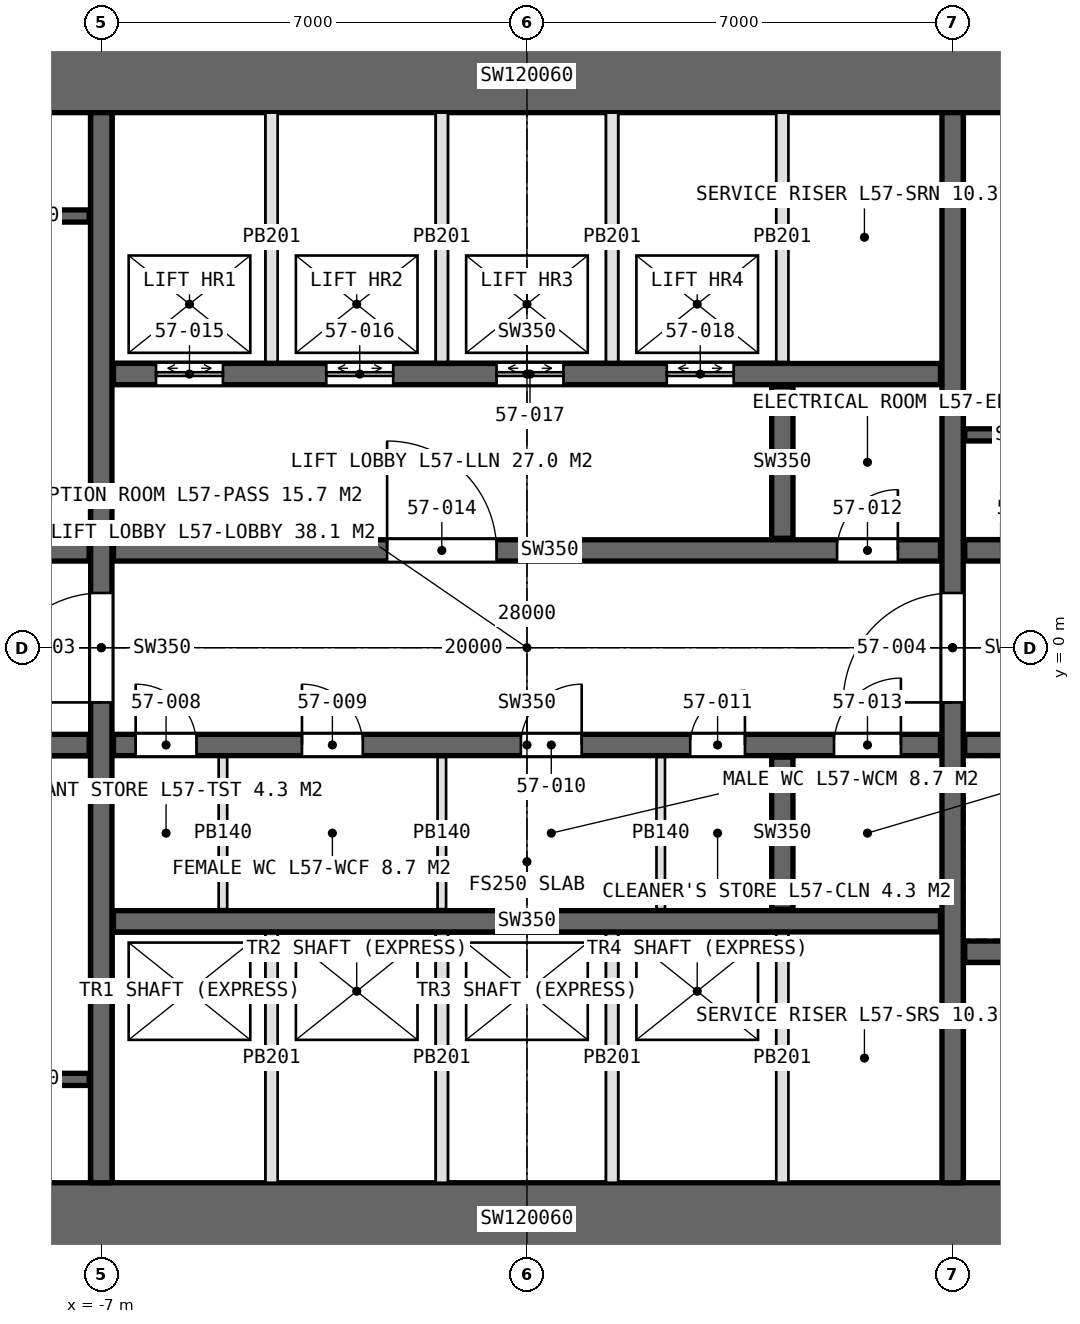
"""IFC4 building model, lengths in metres.
Left out: names, types, materials, properties, quantities, classifications, styles, units other than length and angle.
Written with IfcOpenShell. Run it as: python <this file> out.ifc"""

import sys

from ifc_helpers import new_model, si_unit, direction, frame, frame_2d, origin, place, context, subcontext, project, spatial, rectangle, extrude, element, fill, save


model = new_model("IFC4")
c1 = context("Model", 3, precision=1e-05, world=origin(), true_north=direction((0.0, 1.0)))
c2 = subcontext(c1, "Body", "Model", "MODEL_VIEW")
j1 = project(units=[si_unit("LENGTHUNIT", "METRE"), si_unit("PLANEANGLEUNIT", "RADIAN")], contexts=[c1])
p1 = place(None, origin())
s1 = spatial("IfcSite", under=j1, at=p1, CompositionType="ELEMENT")
p2 = place(p1, origin())
s2 = spatial("IfcBuilding", under=s1, at=p2, CompositionType="ELEMENT")
p3 = place(p2, frame((0.0, 0.0, 257.8)))
s3 = spatial("IfcBuildingStorey", under=s2, at=p3, CompositionType="ELEMENT", Elevation=257.8)
p4 = place(p3, frame((-14.0, -9.4, 0.0), z_axis=(0.0, 0.0, 1.0), x_axis=(1.0, 0.0, 0.0)))
e1 = element("IfcWall", 1, at=p4, inside=s3, PredefinedType="SHEAR", context=c2, shape_type="SweptSolid", body=[
    extrude(rectangle(XDim=28.0, YDim=1.2, at=frame_2d((14.0, 0.0))), origin(), (0.0, 0.0, 1.0), 4.2),
])
p5 = place(p4, frame((22.9, 0.0, 0.0)))
e2 = element("IfcOpeningElement", 2, at=p5, cuts=e1, PredefinedType="OPENING", context=c2, shape_type="SweptSolid", body=[
    extrude(rectangle(XDim=2.2, YDim=2.7, at=frame_2d((1.1, 1.35))), frame((0.0, 0.61, 0.0), z_axis=(0.0, -1.0, 0.0), x_axis=(1.0, 0.0, 0.0)), (0.0, 0.0, 1.0), 1.22),
])
p6 = place(p3, frame((14.0, 9.4, 0.0), z_axis=(0.0, 0.0, 1.0), x_axis=(-1.0, 0.0, 0.0)))
e3 = element("IfcWall", 3, at=p6, inside=s3, PredefinedType="SHEAR", context=c2, shape_type="SweptSolid", body=[
    extrude(rectangle(XDim=28.0, YDim=1.2, at=frame_2d((14.0, 0.0))), origin(), (0.0, 0.0, 1.0), 4.2),
])
p7 = place(p6, frame((24.0, 0.0, 0.0)))
e4 = element("IfcOpeningElement", 4, at=p7, cuts=e3, PredefinedType="OPENING", context=c2, shape_type="SweptSolid", body=[
    extrude(rectangle(XDim=1.0, YDim=2.4, at=frame_2d((0.5, 1.2))), frame((0.0, 0.61, 0.0), z_axis=(0.0, -1.0, 0.0), x_axis=(1.0, 0.0, 0.0)), (0.0, 0.0, 1.0), 1.22),
])
p8 = place(p3, frame((-7.0, -8.8, 0.0), z_axis=(0.0, 0.0, 1.0), x_axis=(0.0, 1.0, 0.0)))
e5 = element("IfcWall", 5, at=p8, inside=s3, PredefinedType="SHEAR", context=c2, shape_type="SweptSolid", body=[
    extrude(rectangle(XDim=17.6, YDim=0.35, at=frame_2d((8.8, 0.0))), origin(), (0.0, 0.0, 1.0), 4.2),
])
p9 = place(p8, frame((7.9, 0.0, 0.0)))
e6 = element("IfcOpeningElement", 6, at=p9, cuts=e5, PredefinedType="OPENING", context=c2, shape_type="SweptSolid", body=[
    extrude(rectangle(XDim=1.8, YDim=2.4, at=frame_2d((0.9, 1.2))), frame((0.0, 0.185, 0.0), z_axis=(0.0, -1.0, 0.0), x_axis=(1.0, 0.0, 0.0)), (0.0, 0.0, 1.0), 0.37),
])
p10 = place(p3, frame((7.0, -8.8, 0.0), z_axis=(0.0, 0.0, 1.0), x_axis=(0.0, 1.0, 0.0)))
e7 = element("IfcWall", 7, at=p10, inside=s3, PredefinedType="SHEAR", context=c2, shape_type="SweptSolid", body=[
    extrude(rectangle(XDim=17.6, YDim=0.35, at=frame_2d((8.8, 0.0))), origin(), (0.0, 0.0, 1.0), 4.2),
])
p11 = place(p10, frame((7.9, 0.0, 0.0)))
e8 = element("IfcOpeningElement", 8, at=p11, cuts=e7, PredefinedType="OPENING", context=c2, shape_type="SweptSolid", body=[
    extrude(rectangle(XDim=1.8, YDim=2.4, at=frame_2d((0.9, 1.2))), frame((0.0, 0.185, 0.0), z_axis=(0.0, -1.0, 0.0), x_axis=(1.0, 0.0, 0.0)), (0.0, 0.0, 1.0), 0.37),
])
p12 = place(p3, frame((-6.8, 1.6, 0.0), z_axis=(0.0, 0.0, 1.0), x_axis=(1.0, 0.0, 0.0)))
e9 = element("IfcWall", 9, at=p12, inside=s3, PredefinedType="SHEAR", context=c2, shape_type="SweptSolid", body=[
    extrude(rectangle(XDim=13.6, YDim=0.35, at=frame_2d((6.8, 0.0))), origin(), (0.0, 0.0, 1.0), 4.2),
])
p13 = place(p12, frame((11.9, 0.0, 0.0)))
e10 = element("IfcOpeningElement", 10, at=p13, cuts=e9, PredefinedType="OPENING", context=c2, shape_type="SweptSolid", body=[
    extrude(rectangle(XDim=1.0, YDim=2.4, at=frame_2d((0.5, 1.2))), frame((0.0, 0.185, 0.0), z_axis=(0.0, -1.0, 0.0), x_axis=(1.0, 0.0, 0.0)), (0.0, 0.0, 1.0), 0.37),
])
p14 = place(p12, frame((4.5, 0.0, 0.0)))
e11 = element("IfcOpeningElement", 11, at=p14, cuts=e9, PredefinedType="OPENING", context=c2, shape_type="SweptSolid", body=[
    extrude(rectangle(XDim=1.8, YDim=2.4, at=frame_2d((0.9, 1.2))), frame((0.0, 0.185, 0.0), z_axis=(0.0, -1.0, 0.0), x_axis=(1.0, 0.0, 0.0)), (0.0, 0.0, 1.0), 0.37),
])
p15 = place(p3, frame((-6.8, -1.6, 0.0), z_axis=(0.0, 0.0, 1.0), x_axis=(1.0, 0.0, 0.0)))
e12 = element("IfcWall", 12, at=p15, inside=s3, PredefinedType="SHEAR", context=c2, shape_type="SweptSolid", body=[
    extrude(rectangle(XDim=13.6, YDim=0.35, at=frame_2d((6.8, 0.0))), origin(), (0.0, 0.0, 1.0), 4.2),
])
p16 = place(p15, frame((0.365, 0.0, 0.0)))
e13 = element("IfcOpeningElement", 13, at=p16, cuts=e12, PredefinedType="OPENING", context=c2, shape_type="SweptSolid", body=[
    extrude(rectangle(XDim=1.0, YDim=2.4, at=frame_2d((0.5, 1.2))), frame((0.0, 0.185, 0.0), z_axis=(0.0, -1.0, 0.0), x_axis=(1.0, 0.0, 0.0)), (0.0, 0.0, 1.0), 0.37),
])
p17 = place(p15, frame((3.1, 0.0, 0.0)))
e14 = element("IfcOpeningElement", 14, at=p17, cuts=e12, PredefinedType="OPENING", context=c2, shape_type="SweptSolid", body=[
    extrude(rectangle(XDim=1.0, YDim=2.4, at=frame_2d((0.5, 1.2))), frame((0.0, 0.185, 0.0), z_axis=(0.0, -1.0, 0.0), x_axis=(1.0, 0.0, 0.0)), (0.0, 0.0, 1.0), 0.37),
])
p18 = place(p15, frame((6.7, 0.0, 0.0)))
e15 = element("IfcOpeningElement", 15, at=p18, cuts=e12, PredefinedType="OPENING", context=c2, shape_type="SweptSolid", body=[
    extrude(rectangle(XDim=1.0, YDim=2.4, at=frame_2d((0.5, 1.2))), frame((0.0, 0.185, 0.0), z_axis=(0.0, -1.0, 0.0), x_axis=(1.0, 0.0, 0.0)), (0.0, 0.0, 1.0), 0.37),
])
p19 = place(p15, frame((9.485, 0.0, 0.0)))
e16 = element("IfcOpeningElement", 16, at=p19, cuts=e12, PredefinedType="OPENING", context=c2, shape_type="SweptSolid", body=[
    extrude(rectangle(XDim=0.9, YDim=2.4, at=frame_2d((0.45, 1.2))), frame((0.0, 0.185, 0.0), z_axis=(0.0, -1.0, 0.0), x_axis=(1.0, 0.0, 0.0)), (0.0, 0.0, 1.0), 0.37),
])
p20 = place(p15, frame((11.85, 0.0, 0.0)))
e17 = element("IfcOpeningElement", 17, at=p20, cuts=e12, PredefinedType="OPENING", context=c2, shape_type="SweptSolid", body=[
    extrude(rectangle(XDim=1.1, YDim=2.4, at=frame_2d((0.55, 1.2))), frame((0.0, 0.185, 0.0), z_axis=(0.0, -1.0, 0.0), x_axis=(1.0, 0.0, 0.0)), (0.0, 0.0, 1.0), 0.37),
])
p21 = place(p3, frame((-6.8, 4.5, 0.0), z_axis=(0.0, 0.0, 1.0), x_axis=(1.0, 0.0, 0.0)))
e18 = element("IfcWall", 18, at=p21, inside=s3, PredefinedType="SHEAR", context=c2, shape_type="SweptSolid", body=[
    extrude(rectangle(XDim=13.6, YDim=0.35, at=frame_2d((6.8, 0.0))), origin(), (0.0, 0.0, 1.0), 4.2),
])
p22 = place(p21, frame((0.7, 0.0, 0.0)))
e19 = element("IfcOpeningElement", 19, at=p22, cuts=e18, PredefinedType="OPENING", context=c2, shape_type="SweptSolid", body=[
    extrude(rectangle(XDim=1.1, YDim=2.4, at=frame_2d((0.55, 1.2))), frame((0.0, 0.185, 0.0), z_axis=(0.0, -1.0, 0.0), x_axis=(1.0, 0.0, 0.0)), (0.0, 0.0, 1.0), 0.37),
])
p23 = place(p21, frame((3.5, 0.0, 0.0)))
e20 = element("IfcOpeningElement", 20, at=p23, cuts=e18, PredefinedType="OPENING", context=c2, shape_type="SweptSolid", body=[
    extrude(rectangle(XDim=1.1, YDim=2.4, at=frame_2d((0.55, 1.2))), frame((0.0, 0.185, 0.0), z_axis=(0.0, -1.0, 0.0), x_axis=(1.0, 0.0, 0.0)), (0.0, 0.0, 1.0), 0.37),
])
p24 = place(p21, frame((6.3, 0.0, 0.0)))
e21 = element("IfcOpeningElement", 21, at=p24, cuts=e18, PredefinedType="OPENING", context=c2, shape_type="SweptSolid", body=[
    extrude(rectangle(XDim=1.1, YDim=2.4, at=frame_2d((0.55, 1.2))), frame((0.0, 0.185, 0.0), z_axis=(0.0, -1.0, 0.0), x_axis=(1.0, 0.0, 0.0)), (0.0, 0.0, 1.0), 0.37),
])
p25 = place(p21, frame((9.1, 0.0, 0.0)))
e22 = element("IfcOpeningElement", 22, at=p25, cuts=e18, PredefinedType="OPENING", context=c2, shape_type="SweptSolid", body=[
    extrude(rectangle(XDim=1.1, YDim=2.4, at=frame_2d((0.55, 1.2))), frame((0.0, 0.185, 0.0), z_axis=(0.0, -1.0, 0.0), x_axis=(1.0, 0.0, 0.0)), (0.0, 0.0, 1.0), 0.37),
])
p26 = place(p3, frame((-6.8, -4.5, 0.0), z_axis=(0.0, 0.0, 1.0), x_axis=(1.0, 0.0, 0.0)))
e23 = element("IfcWall", 23, at=p26, inside=s3, PredefinedType="SHEAR", context=c2, shape_type="SweptSolid", body=[
    extrude(rectangle(XDim=13.6, YDim=0.35, at=frame_2d((6.8, 0.0))), origin(), (0.0, 0.0, 1.0), 4.2),
])
for number, where, z_axis, x_axis in (
    (24, (-12.8, 1.6, 0.0), (0.0, 0.0, 1.0), (1.0, 0.0, 0.0)),
    (25, (-12.8, -1.6, 0.0), (0.0, 0.0, 1.0), (1.0, 0.0, 0.0)),
):
    element("IfcWall", number, at=place(p3, frame(where, z_axis=z_axis, x_axis=x_axis)), inside=s3, PredefinedType="SHEAR", context=c2, shape_type="SweptSolid", body=[
        extrude(rectangle(XDim=5.6, YDim=0.35, at=frame_2d((2.8, 0.0))), origin(), (0.0, 0.0, 1.0), 4.2),
    ])
p27 = place(p3, frame((7.2, 1.6, 0.0), z_axis=(0.0, 0.0, 1.0), x_axis=(1.0, 0.0, 0.0)))
e26 = element("IfcWall", 26, at=p27, inside=s3, PredefinedType="SHEAR", context=c2, shape_type="SweptSolid", body=[
    extrude(rectangle(XDim=5.6, YDim=0.35, at=frame_2d((2.8, 0.0))), origin(), (0.0, 0.0, 1.0), 4.2),
])
p28 = place(p27, frame((0.6, 0.0, 0.0)))
e27 = element("IfcOpeningElement", 27, at=p28, cuts=e26, PredefinedType="OPENING", context=c2, shape_type="SweptSolid", body=[
    extrude(rectangle(XDim=1.0, YDim=2.4, at=frame_2d((0.5, 1.2))), frame((0.0, 0.185, 0.0), z_axis=(0.0, -1.0, 0.0), x_axis=(1.0, 0.0, 0.0)), (0.0, 0.0, 1.0), 0.37),
])
p29 = place(p3, frame((7.2, -1.6, 0.0), z_axis=(0.0, 0.0, 1.0), x_axis=(1.0, 0.0, 0.0)))
e28 = element("IfcWall", 28, at=p29, inside=s3, PredefinedType="SHEAR", context=c2, shape_type="SweptSolid", body=[
    extrude(rectangle(XDim=5.6, YDim=0.35, at=frame_2d((2.8, 0.0))), origin(), (0.0, 0.0, 1.0), 4.2),
])
p30 = place(p29, frame((0.9, 0.0, 0.0)))
e29 = element("IfcOpeningElement", 29, at=p30, cuts=e28, PredefinedType="OPENING", context=c2, shape_type="SweptSolid", body=[
    extrude(rectangle(XDim=1.3, YDim=2.4, at=frame_2d((0.65, 1.2))), frame((0.0, 0.185, 0.0), z_axis=(0.0, -1.0, 0.0), x_axis=(1.0, 0.0, 0.0)), (0.0, 0.0, 1.0), 0.37),
])
p31 = place(p29, frame((3.9, 0.0, 0.0)))
e30 = element("IfcOpeningElement", 30, at=p31, cuts=e28, PredefinedType="OPENING", context=c2, shape_type="SweptSolid", body=[
    extrude(rectangle(XDim=1.3, YDim=2.4, at=frame_2d((0.65, 1.2))), frame((0.0, 0.185, 0.0), z_axis=(0.0, -1.0, 0.0), x_axis=(1.0, 0.0, 0.0)), (0.0, 0.0, 1.0), 0.37),
])
p32 = place(p3, frame((7.2, -5.0, 0.0), z_axis=(0.0, 0.0, 1.0), x_axis=(1.0, 0.0, 0.0)))
e31 = element("IfcWall", 31, at=p32, inside=s3, PredefinedType="SHEAR", context=c2, shape_type="SweptSolid", body=[
    extrude(rectangle(XDim=5.6, YDim=0.35, at=frame_2d((2.8, 0.0))), origin(), (0.0, 0.0, 1.0), 4.2),
])
for number, where, z_axis, x_axis in (
    (32, (4.2, 1.8, 0.0), (0.0, 0.0, 1.0), (0.0, 1.0, 0.0)),
    (33, (4.2, -4.3, 0.0), (0.0, 0.0, 1.0), (0.0, 1.0, 0.0)),
):
    element("IfcWall", number, at=place(p3, frame(where, z_axis=z_axis, x_axis=x_axis)), inside=s3, PredefinedType="SHEAR", context=c2, shape_type="SweptSolid", body=[
        extrude(rectangle(XDim=2.5, YDim=0.35, at=frame_2d((1.25, 0.0))), origin(), (0.0, 0.0, 1.0), 4.2),
    ])
for number, where, z_axis, x_axis in (
    (34, (-5.0, -1.8, 0.0), (0.0, 0.0, 1.0), (0.0, -1.0, 0.0)),
    (35, (-1.4, -1.8, 0.0), (0.0, 0.0, 1.0), (0.0, -1.0, 0.0)),
    (36, (2.2, -1.8, 0.0), (0.0, 0.0, 1.0), (0.0, -1.0, 0.0)),
):
    element("IfcWall", number, at=place(p3, frame(where, z_axis=z_axis, x_axis=x_axis)), inside=s3, PredefinedType="PARTITIONING", context=c2, shape_type="SweptSolid", body=[
        extrude(rectangle(XDim=2.5, YDim=0.14, at=frame_2d((1.25, 0.0))), origin(), (0.0, 0.0, 1.0), 3.95),
    ])
for number, where, z_axis, x_axis in (
    (37, (-4.2, 4.7, 0.0), (0.0, 0.0, 1.0), (0.0, 1.0, 0.0)),
    (38, (-1.4, 4.7, 0.0), (0.0, 0.0, 1.0), (0.0, 1.0, 0.0)),
    (39, (1.4, 4.7, 0.0), (0.0, 0.0, 1.0), (0.0, 1.0, 0.0)),
    (40, (4.2, 4.7, 0.0), (0.0, 0.0, 1.0), (0.0, 1.0, 0.0)),
    (41, (-4.2, -4.7, 0.0), (0.0, 0.0, 1.0), (0.0, -1.0, 0.0)),
    (42, (-1.4, -4.7, 0.0), (0.0, 0.0, 1.0), (0.0, -1.0, 0.0)),
    (43, (1.4, -4.7, 0.0), (0.0, 0.0, 1.0), (0.0, -1.0, 0.0)),
    (44, (4.2, -4.7, 0.0), (0.0, 0.0, 1.0), (0.0, -1.0, 0.0)),
):
    element("IfcWall", number, at=place(p3, frame(where, z_axis=z_axis, x_axis=x_axis)), inside=s3, PredefinedType="PARTITIONING", context=c2, shape_type="SweptSolid", body=[
        extrude(rectangle(XDim=4.1, YDim=0.2, at=frame_2d((2.05, 0.0))), origin(), (0.0, 0.0, 1.0), 4.2),
    ])
for number, where, z_axis, x_axis in (
    (45, (-9.15, 7.1, 0.0), (0.0, 0.0, 1.0), (1.0, 0.0, 0.0)),
    (46, (-9.15, -7.1, 0.0), (0.0, 0.0, 1.0), (1.0, 0.0, 0.0)),
    (47, (9.15, 3.5, 0.0), (0.0, 0.0, 1.0), (-1.0, 0.0, 0.0)),
):
    element("IfcWall", number, at=place(p3, frame(where, z_axis=z_axis, x_axis=x_axis)), inside=s3, PredefinedType="SOLIDWALL", context=c2, shape_type="SweptSolid", body=[
        extrude(rectangle(XDim=1.95, YDim=0.2, at=frame_2d((0.975, 0.0))), origin(), (0.0, 0.0, 1.0), 4.2),
    ])
p33 = place(p9, origin())
e48 = element("IfcDoor", 48, at=p33, inside=s3, OperationType="DOUBLE_DOOR_SINGLE_SWING", PredefinedType="DOOR", context=c2, shape_type="SweptSolid", body=[
    extrude(rectangle(XDim=1.8, YDim=2.4, at=frame_2d((0.9, 1.2))), frame((0.0, 0.025, 0.0), z_axis=(0.0, -1.0, 0.0), x_axis=(1.0, 0.0, 0.0)), (0.0, 0.0, 1.0), 0.05),
])
fill(e6, e48)
p34 = place(p11, origin())
e49 = element("IfcDoor", 49, at=p34, inside=s3, OperationType="DOUBLE_DOOR_SINGLE_SWING", PredefinedType="DOOR", context=c2, shape_type="SweptSolid", body=[
    extrude(rectangle(XDim=1.8, YDim=2.4, at=frame_2d((0.9, 1.2))), frame((0.0, 0.025, 0.0), z_axis=(0.0, -1.0, 0.0), x_axis=(1.0, 0.0, 0.0)), (0.0, 0.0, 1.0), 0.05),
])
fill(e8, e49)
p35 = place(p16, origin())
e50 = element("IfcDoor", 50, at=p35, inside=s3, OperationType="SINGLE_SWING_LEFT", PredefinedType="DOOR", context=c2, shape_type="SweptSolid", body=[
    extrude(rectangle(XDim=1.0, YDim=2.4, at=frame_2d((0.5, 1.2))), frame((0.0, 0.025, 0.0), z_axis=(0.0, -1.0, 0.0), x_axis=(1.0, 0.0, 0.0)), (0.0, 0.0, 1.0), 0.05),
])
fill(e13, e50)
p36 = place(p17, origin())
e51 = element("IfcDoor", 51, at=p36, inside=s3, OperationType="SINGLE_SWING_LEFT", PredefinedType="DOOR", context=c2, shape_type="SweptSolid", body=[
    extrude(rectangle(XDim=1.0, YDim=2.4, at=frame_2d((0.5, 1.2))), frame((0.0, 0.025, 0.0), z_axis=(0.0, -1.0, 0.0), x_axis=(1.0, 0.0, 0.0)), (0.0, 0.0, 1.0), 0.05),
])
fill(e14, e51)
p37 = place(p18, origin())
e52 = element("IfcDoor", 52, at=p37, inside=s3, OperationType="SINGLE_SWING_RIGHT", PredefinedType="DOOR", context=c2, shape_type="SweptSolid", body=[
    extrude(rectangle(XDim=1.0, YDim=2.4, at=frame_2d((0.5, 1.2))), frame((0.0, 0.025, 0.0), z_axis=(0.0, -1.0, 0.0), x_axis=(1.0, 0.0, 0.0)), (0.0, 0.0, 1.0), 0.05),
])
fill(e15, e52)
p38 = place(p19, origin())
e53 = element("IfcDoor", 53, at=p38, inside=s3, OperationType="SINGLE_SWING_RIGHT", PredefinedType="DOOR", context=c2, shape_type="SweptSolid", body=[
    extrude(rectangle(XDim=0.9, YDim=2.4, at=frame_2d((0.45, 1.2))), frame((0.0, 0.025, 0.0), z_axis=(0.0, -1.0, 0.0), x_axis=(1.0, 0.0, 0.0)), (0.0, 0.0, 1.0), 0.05),
])
fill(e16, e53)
p39 = place(p13, origin())
e54 = element("IfcDoor", 54, at=p39, inside=s3, OperationType="SINGLE_SWING_RIGHT", PredefinedType="DOOR", context=c2, shape_type="SweptSolid", body=[
    extrude(rectangle(XDim=1.0, YDim=2.4, at=frame_2d((0.5, 1.2))), frame((0.0, 0.025, 0.0), z_axis=(0.0, -1.0, 0.0), x_axis=(1.0, 0.0, 0.0)), (0.0, 0.0, 1.0), 0.05),
])
fill(e10, e54)
p40 = place(p20, origin())
e55 = element("IfcDoor", 55, at=p40, inside=s3, OperationType="SINGLE_SWING_RIGHT", PredefinedType="DOOR", context=c2, shape_type="SweptSolid", body=[
    extrude(rectangle(XDim=1.1, YDim=2.4, at=frame_2d((0.55, 1.2))), frame((0.0, 0.025, 0.0), z_axis=(0.0, -1.0, 0.0), x_axis=(1.0, 0.0, 0.0)), (0.0, 0.0, 1.0), 0.05),
])
fill(e17, e55)
p41 = place(p14, origin())
e56 = element("IfcDoor", 56, at=p41, inside=s3, OperationType="DOUBLE_DOOR_SINGLE_SWING", PredefinedType="DOOR", context=c2, shape_type="SweptSolid", body=[
    extrude(rectangle(XDim=1.8, YDim=2.4, at=frame_2d((0.9, 1.2))), frame((0.0, 0.025, 0.0), z_axis=(0.0, -1.0, 0.0), x_axis=(1.0, 0.0, 0.0)), (0.0, 0.0, 1.0), 0.05),
])
fill(e11, e56)
p42 = place(p22, origin())
e57 = element("IfcDoor", 57, at=p42, inside=s3, OperationType="DOUBLE_DOOR_SLIDING", PredefinedType="DOOR", context=c2, shape_type="SweptSolid", body=[
    extrude(rectangle(XDim=1.1, YDim=2.4, at=frame_2d((0.55, 1.2))), frame((0.0, 0.025, 0.0), z_axis=(0.0, -1.0, 0.0), x_axis=(1.0, 0.0, 0.0)), (0.0, 0.0, 1.0), 0.05),
])
fill(e19, e57)
p43 = place(p23, origin())
e58 = element("IfcDoor", 58, at=p43, inside=s3, OperationType="DOUBLE_DOOR_SLIDING", PredefinedType="DOOR", context=c2, shape_type="SweptSolid", body=[
    extrude(rectangle(XDim=1.1, YDim=2.4, at=frame_2d((0.55, 1.2))), frame((0.0, 0.025, 0.0), z_axis=(0.0, -1.0, 0.0), x_axis=(1.0, 0.0, 0.0)), (0.0, 0.0, 1.0), 0.05),
])
fill(e20, e58)
p44 = place(p24, origin())
e59 = element("IfcDoor", 59, at=p44, inside=s3, OperationType="DOUBLE_DOOR_SLIDING", PredefinedType="DOOR", context=c2, shape_type="SweptSolid", body=[
    extrude(rectangle(XDim=1.1, YDim=2.4, at=frame_2d((0.55, 1.2))), frame((0.0, 0.025, 0.0), z_axis=(0.0, -1.0, 0.0), x_axis=(1.0, 0.0, 0.0)), (0.0, 0.0, 1.0), 0.05),
])
fill(e21, e59)
p45 = place(p25, origin())
e60 = element("IfcDoor", 60, at=p45, inside=s3, OperationType="DOUBLE_DOOR_SLIDING", PredefinedType="DOOR", context=c2, shape_type="SweptSolid", body=[
    extrude(rectangle(XDim=1.1, YDim=2.4, at=frame_2d((0.55, 1.2))), frame((0.0, 0.025, 0.0), z_axis=(0.0, -1.0, 0.0), x_axis=(1.0, 0.0, 0.0)), (0.0, 0.0, 1.0), 0.05),
])
fill(e22, e60)
save(model, sys.argv[1])
